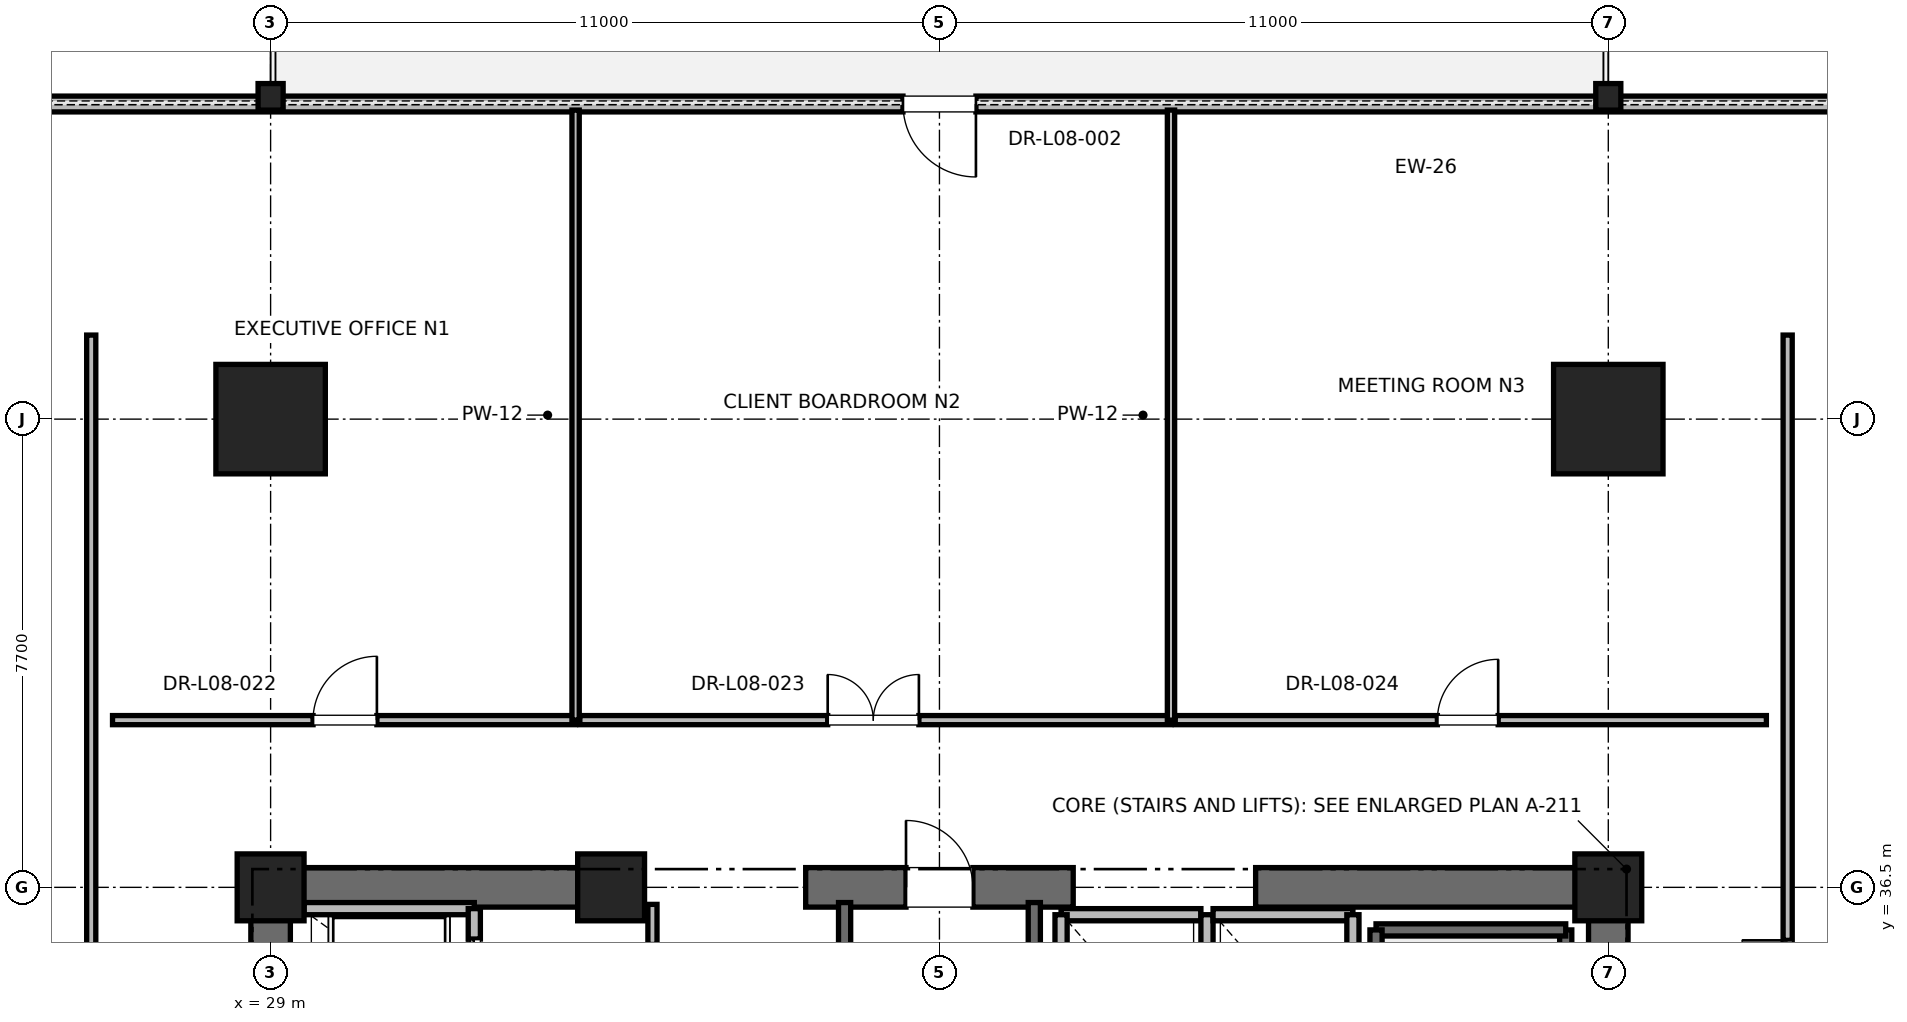
"""IFC4 building model, lengths in metres.
Left out: names, types, materials, properties, quantities, classifications, styles, units other than length and angle.
Written with IfcOpenShell. Run it as: python <this file> out.ifc"""

import sys

from ifc_helpers import new_model, si_unit, direction, frame, frame_2d, origin, origin_2d, place, context, subcontext, project, spatial, rectangle, i_section, extrude, element, fill, save


model = new_model("IFC4")
c1 = context("Model", 3, precision=1e-05, world=origin(), true_north=direction((0.0, 1.0)))
c2 = subcontext(c1, "Body", "Model", "MODEL_VIEW")
j1 = project(units=[si_unit("LENGTHUNIT", "METRE"), si_unit("PLANEANGLEUNIT", "RADIAN")], contexts=[c1])
p1 = place(None, origin())
s1 = spatial("IfcSite", under=j1, at=p1, CompositionType="ELEMENT")
p2 = place(p1, origin())
s2 = spatial("IfcBuilding", under=s1, at=p2, CompositionType="ELEMENT")
p3 = place(p2, frame((0.0, 0.0, 39.6)))
s3 = spatial("IfcBuildingStorey", under=s2, at=p3, CompositionType="ELEMENT", Elevation=39.6)
for number, where, z_axis, x_axis in (
    (1, (29.0, 44.2, 0.0), (0.0, 0.0, 1.0), (1.0, 0.0, 0.0)),
    (2, (51.0, 44.2, 0.0), (0.0, 0.0, 1.0), (1.0, 0.0, 0.0)),
):
    element("IfcColumn", number, at=place(p3, frame(where, z_axis=z_axis, x_axis=x_axis)), inside=s3, PredefinedType="COLUMN", context=c2, shape_type="SweptSolid", body=[
        extrude(rectangle(XDim=1.8, YDim=1.8, at=origin_2d()), origin(), (0.0, 0.0, 1.0), 4.0),
    ])
for number, where, z_axis, x_axis in (
    (3, (29.0, 49.5, 0.0), (0.0, 0.0, 1.0), (1.0, 0.0, 0.0)),
    (4, (51.0, 49.5, 0.0), (0.0, 0.0, 1.0), (1.0, 0.0, 0.0)),
):
    element("IfcColumn", number, at=place(p3, frame(where, z_axis=z_axis, x_axis=x_axis)), inside=s3, PredefinedType="COLUMN", context=c2, shape_type="SweptSolid", body=[
        extrude(i_section(OverallWidth=0.412, OverallDepth=0.437, WebThickness=0.036, FlangeThickness=0.058, FilletRadius=0.015, at=origin_2d()), origin(), (0.0, 0.0, 1.0), 4.0),
    ])
for number, where, z_axis, x_axis in (
    (5, (29.0, 36.5, 0.0), (0.0, 0.0, 1.0), (1.0, 0.0, 0.0)),
    (6, (51.0, 36.5, 0.0), (0.0, 0.0, 1.0), (1.0, 0.0, 0.0)),
    (7, (34.6, 36.5, 0.0), (0.0, 0.0, 1.0), (1.0, 0.0, 0.0)),
):
    element("IfcColumn", number, at=place(p3, frame(where, z_axis=z_axis, x_axis=x_axis)), inside=s3, PredefinedType="PILASTER", context=c2, shape_type="SweptSolid", body=[
        extrude(rectangle(XDim=1.1, YDim=1.1, at=origin_2d()), origin(), (0.0, 0.0, 1.0), 4.0),
    ])
p4 = place(p3, frame((29.0, 36.5, 0.0), z_axis=(0.0, 0.0, 1.0), x_axis=(1.0, 0.0, 0.0)))
e8 = element("IfcWall", 8, at=p4, inside=s3, PredefinedType="SHEAR", context=c2, shape_type="SweptSolid", body=[
    extrude(rectangle(XDim=5.8, YDim=0.65, at=frame_2d((2.9, 0.0))), origin(), (0.0, 0.0, 1.0), 3.76),
])
p5 = place(p3, frame((37.8, 36.5, 0.0), z_axis=(0.0, 0.0, 1.0), x_axis=(1.0, 0.0, 0.0)))
e9 = element("IfcWall", 9, at=p5, inside=s3, PredefinedType="SHEAR", context=c2, shape_type="SweptSolid", body=[
    extrude(rectangle(XDim=4.4, YDim=0.65, at=frame_2d((2.2, 0.0))), origin(), (0.0, 0.0, 1.0), 3.76),
])
p6 = place(p5, frame((1.65, 0.0, 0.0)))
e10 = element("IfcOpeningElement", 10, at=p6, cuts=e9, PredefinedType="OPENING", context=c2, shape_type="SweptSolid", body=[
    extrude(rectangle(XDim=1.1, YDim=2.15, at=frame_2d((0.55, 1.075))), frame((0.0, 0.325, 0.0), z_axis=(0.0, -1.0, 0.0), x_axis=(1.0, 0.0, 0.0)), (0.0, 0.0, 1.0), 0.65),
])
for number, where, z_axis, x_axis in (
    (11, (45.2, 36.5, 0.0), (0.0, 0.0, 1.0), (1.0, 0.0, 0.0)),
    (12, (29.0, 30.7, 0.0), (0.0, 0.0, 1.0), (0.0, 1.0, 0.0)),
):
    element("IfcWall", number, at=place(p3, frame(where, z_axis=z_axis, x_axis=x_axis)), inside=s3, PredefinedType="SHEAR", context=c2, shape_type="SweptSolid", body=[
        extrude(rectangle(XDim=5.8, YDim=0.65, at=frame_2d((2.9, 0.0))), origin(), (0.0, 0.0, 1.0), 3.76),
    ])
p7 = place(p3, frame((51.0, 27.7, 0.0), z_axis=(0.0, 0.0, 1.0), x_axis=(0.0, 1.0, 0.0)))
e13 = element("IfcWall", 13, at=p7, inside=s3, PredefinedType="SHEAR", context=c2, shape_type="SweptSolid", body=[
    extrude(rectangle(XDim=8.8, YDim=0.65, at=frame_2d((4.4, 0.0))), origin(), (0.0, 0.0, 1.0), 3.76),
])
p8 = place(p3, frame((61.403, 49.382, 0.0), z_axis=(0.0, 0.0, 1.0), x_axis=(-1.0, 0.0, 0.0)))
e14 = element("IfcWall", 14, at=p8, inside=s3, PredefinedType="PARAPET", context=c2, shape_type="SweptSolid", body=[
    extrude(rectangle(XDim=42.807, YDim=0.26, at=frame_2d((21.403, 0.0))), origin(), (0.0, 0.0, 1.0), 2.889),
])
p9 = place(p8, frame((4.2, 0.0, 0.85)))
e15 = element("IfcOpeningElement", 15, at=p9, cuts=e14, PredefinedType="OPENING", context=c2, shape_type="SweptSolid", body=[
    extrude(rectangle(XDim=1.8, YDim=2.2, at=frame_2d((0.9, 1.1))), frame((0.0, 0.13, 0.0), z_axis=(0.0, -1.0, 0.0), x_axis=(1.0, 0.0, 0.0)), (0.0, 0.0, 1.0), 0.26),
])
p10 = place(p8, frame((20.803, 0.0, 0.0)))
e16 = element("IfcOpeningElement", 16, at=p10, cuts=e14, PredefinedType="OPENING", context=c2, shape_type="SweptSolid", body=[
    extrude(rectangle(XDim=1.2, YDim=2.2, at=frame_2d((0.6, 1.1))), frame((0.0, 0.13, 0.0), z_axis=(0.0, -1.0, 0.0), x_axis=(1.0, 0.0, 0.0)), (0.0, 0.0, 1.0), 0.26),
])
p11 = place(p8, frame((36.806, 0.0, 0.85)))
e17 = element("IfcOpeningElement", 17, at=p11, cuts=e14, PredefinedType="OPENING", context=c2, shape_type="SweptSolid", body=[
    extrude(rectangle(XDim=1.8, YDim=2.2, at=frame_2d((0.9, 1.1))), frame((0.0, 0.13, 0.0), z_axis=(0.0, -1.0, 0.0), x_axis=(1.0, 0.0, 0.0)), (0.0, 0.0, 1.0), 0.26),
])
p12 = place(p3, frame((50.3, 27.65, 0.0), z_axis=(0.0, 0.0, 1.0), x_axis=(0.0, 1.0, 0.0)))
e18 = element("IfcWall", 18, at=p12, inside=s3, PredefinedType="SOLIDWALL", context=c2, shape_type="SweptSolid", body=[
    extrude(rectangle(XDim=8.15, YDim=0.2, at=frame_2d((4.075, 0.0))), origin(), (0.0, 0.0, 1.0), 3.76),
])
p13 = place(p3, frame((47.18, 35.8, 0.0), z_axis=(0.0, 0.0, 1.0), x_axis=(1.0, 0.0, 0.0)))
e19 = element("IfcWall", 19, at=p13, inside=s3, PredefinedType="SOLIDWALL", context=c2, shape_type="SweptSolid", body=[
    extrude(rectangle(XDim=3.12, YDim=0.2, at=frame_2d((1.56, 0.0))), origin(), (0.0, 0.0, 1.0), 3.76),
])
p14 = place(p3, frame((47.18, 27.62, 0.0), z_axis=(0.0, 0.0, 1.0), x_axis=(0.0, 1.0, 0.0)))
e20 = element("IfcWall", 20, at=p14, inside=s3, PredefinedType="SOLIDWALL", context=c2, shape_type="SweptSolid", body=[
    extrude(rectangle(XDim=8.18, YDim=0.2, at=frame_2d((4.09, 0.0))), origin(), (0.0, 0.0, 1.0), 3.76),
])
p15 = place(p3, frame((38.44, 27.38, 0.0), z_axis=(0.0, 0.0, 1.0), x_axis=(0.0, 1.0, 0.0)))
e21 = element("IfcWall", 21, at=p15, inside=s3, PredefinedType="SOLIDWALL", context=c2, shape_type="SweptSolid", body=[
    extrude(rectangle(XDim=8.87, YDim=0.2, at=frame_2d((4.435, 0.0))), origin(), (0.0, 0.0, 1.0), 3.76),
])
p16 = place(p3, frame((41.56, 27.68, 0.0), z_axis=(0.0, 0.0, 1.0), x_axis=(0.0, 1.0, 0.0)))
e22 = element("IfcWall", 22, at=p16, inside=s3, PredefinedType="SOLIDWALL", context=c2, shape_type="SweptSolid", body=[
    extrude(rectangle(XDim=8.57, YDim=0.2, at=frame_2d((4.285, 0.0))), origin(), (0.0, 0.0, 1.0), 3.76),
])
p17 = place(p3, frame((32.35, 36.15, 0.0), z_axis=(0.0, 0.0, 1.0), x_axis=(-1.0, 0.0, 0.0)))
e23 = element("IfcWall", 23, at=p17, inside=s3, PredefinedType="SOLIDWALL", context=c2, shape_type="SweptSolid", body=[
    extrude(rectangle(XDim=2.8, YDim=0.2, at=frame_2d((1.4, 0.0))), origin(), (0.0, 0.0, 1.0), 2.889),
])
p18 = place(p3, frame((32.35, 34.05, 0.0), z_axis=(0.0, 0.0, 1.0), x_axis=(0.0, 1.0, 0.0)))
e24 = element("IfcWall", 24, at=p18, inside=s3, PredefinedType="SOLIDWALL", context=c2, shape_type="SweptSolid", body=[
    extrude(rectangle(XDim=2.1, YDim=0.2, at=frame_2d((1.05, 0.0))), origin(), (0.0, 0.0, 1.0), 3.76),
])
p19 = place(p18, frame((0.5, 0.0, 0.0)))
e25 = element("IfcOpeningElement", 25, at=p19, cuts=e24, PredefinedType="OPENING", context=c2, shape_type="SweptSolid", body=[
    extrude(rectangle(XDim=1.1, YDim=2.2, at=frame_2d((0.55, 1.1))), frame((0.0, 0.1, 0.0), z_axis=(0.0, -1.0, 0.0), x_axis=(1.0, 0.0, 0.0)), (0.0, 0.0, 1.0), 0.2),
])
p20 = place(p3, frame((44.3, 36.05, 0.0), z_axis=(0.0, 0.0, 1.0), x_axis=(-1.0, 0.0, 0.0)))
e26 = element("IfcWall", 26, at=p20, inside=s3, PredefinedType="SOLIDWALL", context=c2, shape_type="SweptSolid", body=[
    extrude(rectangle(XDim=2.3, YDim=0.2, at=frame_2d((1.15, 0.0))), origin(), (0.0, 0.0, 1.0), 2.54),
])
for number, where, z_axis, x_axis in (
    (27, (42.0, 36.05, 0.0), (0.0, 0.0, 1.0), (0.0, -1.0, 0.0)),
    (28, (44.4, 33.45, 0.0), (0.0, 0.0, 1.0), (0.0, 1.0, 0.0)),
):
    element("IfcWall", number, at=place(p3, frame(where, z_axis=z_axis, x_axis=x_axis)), inside=s3, PredefinedType="SOLIDWALL", context=c2, shape_type="SweptSolid", body=[
        extrude(rectangle(XDim=2.6, YDim=0.2, at=frame_2d((1.3, 0.0))), origin(), (0.0, 0.0, 1.0), 2.54),
    ])
p21 = place(p3, frame((46.8, 36.05, 0.0), z_axis=(0.0, 0.0, 1.0), x_axis=(-1.0, 0.0, 0.0)))
e29 = element("IfcWall", 29, at=p21, inside=s3, PredefinedType="SOLIDWALL", context=c2, shape_type="SweptSolid", body=[
    extrude(rectangle(XDim=2.3, YDim=0.2, at=frame_2d((1.15, 0.0))), origin(), (0.0, 0.0, 1.0), 2.54),
])
p22 = place(p3, frame((46.8, 33.45, 0.0), z_axis=(0.0, 0.0, 1.0), x_axis=(0.0, 1.0, 0.0)))
e30 = element("IfcWall", 30, at=p22, inside=s3, PredefinedType="SOLIDWALL", context=c2, shape_type="SweptSolid", body=[
    extrude(rectangle(XDim=2.6, YDim=0.2, at=frame_2d((1.3, 0.0))), origin(), (0.0, 0.0, 1.0), 3.76),
])
p23 = place(p3, frame((35.28, 33.95, 0.0), z_axis=(0.0, 0.0, 1.0), x_axis=(0.0, 1.0, 0.0)))
e31 = element("IfcWall", 31, at=p23, inside=s3, PredefinedType="PARTITIONING", context=c2, shape_type="SweptSolid", body=[
    extrude(rectangle(XDim=2.27, YDim=0.15, at=frame_2d((1.135, 0.0))), origin(), (0.0, 0.0, 1.0), 2.54),
])
p24 = place(p23, frame((0.66, 0.0, 0.0)))
e32 = element("IfcOpeningElement", 32, at=p24, cuts=e31, PredefinedType="OPENING", context=c2, shape_type="SweptSolid", body=[
    extrude(rectangle(XDim=0.95, YDim=2.15, at=frame_2d((0.475, 1.075))), frame((0.0, 0.075, 0.0), z_axis=(0.0, -1.0, 0.0), x_axis=(1.0, 0.0, 0.0)), (0.0, 0.0, 1.0), 0.15),
])
p25 = place(p3, frame((26.4, 39.25, 0.0), z_axis=(0.0, 0.0, 1.0), x_axis=(1.0, 0.0, 0.0)))
e33 = element("IfcWall", 33, at=p25, inside=s3, PredefinedType="PARTITIONING", context=c2, shape_type="SweptSolid", body=[
    extrude(rectangle(XDim=7.616, YDim=0.15, at=frame_2d((3.808, 0.0))), origin(), (0.0, 0.0, 1.0), 2.85),
])
p26 = place(p25, frame((3.298, 0.0, 0.0)))
e34 = element("IfcOpeningElement", 34, at=p26, cuts=e33, PredefinedType="OPENING", context=c2, shape_type="SweptSolid", body=[
    extrude(rectangle(XDim=1.05, YDim=2.2, at=frame_2d((0.525, 1.1))), frame((0.0, 0.075, 0.0), z_axis=(0.0, -1.0, 0.0), x_axis=(1.0, 0.0, 0.0)), (0.0, 0.0, 1.0), 0.15),
])
p27 = place(p3, frame((34.016, 39.25, 0.0), z_axis=(0.0, 0.0, 1.0), x_axis=(0.0, 1.0, 0.0)))
e35 = element("IfcWall", 35, at=p27, inside=s3, PredefinedType="PARTITIONING", context=c2, shape_type="SweptSolid", body=[
    extrude(rectangle(XDim=10.032, YDim=0.12, at=frame_2d((5.016, 0.0))), origin(), (0.0, 0.0, 1.0), 2.39),
])
p28 = place(p3, frame((34.086, 39.25, 0.0), z_axis=(0.0, 0.0, 1.0), x_axis=(1.0, 0.0, 0.0)))
e36 = element("IfcWall", 36, at=p28, inside=s3, PredefinedType="PARTITIONING", context=c2, shape_type="SweptSolid", body=[
    extrude(rectangle(XDim=9.722, YDim=0.15, at=frame_2d((4.861, 0.0))), origin(), (0.0, 0.0, 1.0), 2.85),
])
p29 = place(p28, frame((4.076, 0.0, 0.0)))
e37 = element("IfcOpeningElement", 37, at=p29, cuts=e36, PredefinedType="OPENING", context=c2, shape_type="SweptSolid", body=[
    extrude(rectangle(XDim=1.5, YDim=2.25, at=frame_2d((0.75, 1.125))), frame((0.0, 0.075, 0.0), z_axis=(0.0, -1.0, 0.0), x_axis=(1.0, 0.0, 0.0)), (0.0, 0.0, 1.0), 0.15),
])
p30 = place(p3, frame((43.808, 39.25, 0.0), z_axis=(0.0, 0.0, 1.0), x_axis=(0.0, 1.0, 0.0)))
e38 = element("IfcWall", 38, at=p30, inside=s3, PredefinedType="PARTITIONING", context=c2, shape_type="SweptSolid", body=[
    extrude(rectangle(XDim=10.032, YDim=0.12, at=frame_2d((5.016, 0.0))), origin(), (0.0, 0.0, 1.0), 2.39),
])
p31 = place(p3, frame((43.878, 39.25, 0.0), z_axis=(0.0, 0.0, 1.0), x_axis=(1.0, 0.0, 0.0)))
e39 = element("IfcWall", 39, at=p31, inside=s3, PredefinedType="PARTITIONING", context=c2, shape_type="SweptSolid", body=[
    extrude(rectangle(XDim=9.722, YDim=0.15, at=frame_2d((4.861, 0.0))), origin(), (0.0, 0.0, 1.0), 2.85),
])
p32 = place(p31, frame((4.311, 0.0, 0.0)))
e40 = element("IfcOpeningElement", 40, at=p32, cuts=e39, PredefinedType="OPENING", context=c2, shape_type="SweptSolid", body=[
    extrude(rectangle(XDim=1.0, YDim=2.15, at=frame_2d((0.5, 1.075))), frame((0.0, 0.075, 0.0), z_axis=(0.0, -1.0, 0.0), x_axis=(1.0, 0.0, 0.0)), (0.0, 0.0, 1.0), 0.15),
])
p33 = place(p3, frame((26.05, 23.23, 0.0), z_axis=(0.0, 0.0, 1.0), x_axis=(0.0, 1.0, 0.0)))
e41 = element("IfcWall", 41, at=p33, inside=s3, PredefinedType="PARTITIONING", context=c2, shape_type="SweptSolid", body=[
    extrude(rectangle(XDim=22.352, YDim=0.15, at=frame_2d((11.176, 0.0))), origin(), (0.0, 0.0, 1.0), 2.85),
])
p34 = place(p33, frame((6.085, 0.0, 0.0)))
e42 = element("IfcOpeningElement", 42, at=p34, cuts=e41, PredefinedType="OPENING", context=c2, shape_type="SweptSolid", body=[
    extrude(rectangle(XDim=1.0, YDim=2.15, at=frame_2d((0.5, 1.075))), frame((0.0, 0.075, 0.0), z_axis=(0.0, -1.0, 0.0), x_axis=(1.0, 0.0, 0.0)), (0.0, 0.0, 1.0), 0.15),
])
p35 = place(p3, frame((53.95, 33.356, 0.0), z_axis=(0.0, 0.0, 1.0), x_axis=(0.0, 1.0, 0.0)))
e43 = element("IfcWall", 43, at=p35, inside=s3, PredefinedType="PARTITIONING", context=c2, shape_type="SweptSolid", body=[
    extrude(rectangle(XDim=12.226, YDim=0.15, at=frame_2d((6.113, 0.0))), origin(), (0.0, 0.0, 1.0), 2.85),
])
p36 = place(p35, frame((0.772, 0.0, 0.0)))
e44 = element("IfcOpeningElement", 44, at=p36, cuts=e43, PredefinedType="OPENING", context=c2, shape_type="SweptSolid", body=[
    extrude(rectangle(XDim=1.5, YDim=2.25, at=frame_2d((0.75, 1.125))), frame((0.0, 0.075, 0.0), z_axis=(0.0, -1.0, 0.0), x_axis=(1.0, 0.0, 0.0)), (0.0, 0.0, 1.0), 0.15),
])
p37 = place(p10, origin())
e45 = element("IfcDoor", 45, at=p37, inside=s3, OperationType="SINGLE_SWING_LEFT", PredefinedType="DOOR", context=c2, shape_type="SweptSolid", body=[
    extrude(rectangle(XDim=1.2, YDim=2.2, at=frame_2d((0.6, 1.1))), frame((0.0, 0.025, 0.0), z_axis=(0.0, -1.0, 0.0), x_axis=(1.0, 0.0, 0.0)), (0.0, 0.0, 1.0), 0.05),
])
fill(e16, e45)
p38 = place(p6, origin())
e46 = element("IfcDoor", 46, at=p38, inside=s3, OperationType="SINGLE_SWING_LEFT", PredefinedType="DOOR", context=c2, shape_type="SweptSolid", body=[
    extrude(rectangle(XDim=1.1, YDim=2.15, at=frame_2d((0.55, 1.075))), frame((0.0, 0.025, 0.0), z_axis=(0.0, -1.0, 0.0), x_axis=(1.0, 0.0, 0.0)), (0.0, 0.0, 1.0), 0.05),
])
fill(e10, e46)
p39 = place(p19, origin())
e47 = element("IfcDoor", 47, at=p39, inside=s3, OperationType="SLIDING_TO_RIGHT", PredefinedType="DOOR", context=c2, shape_type="SweptSolid", body=[
    extrude(rectangle(XDim=1.1, YDim=2.2, at=frame_2d((0.55, 1.1))), frame((0.0, 0.025, 0.0), z_axis=(0.0, -1.0, 0.0), x_axis=(1.0, 0.0, 0.0)), (0.0, 0.0, 1.0), 0.05),
])
fill(e25, e47)
p40 = place(p26, origin())
e48 = element("IfcDoor", 48, at=p40, inside=s3, OperationType="SINGLE_SWING_RIGHT", PredefinedType="DOOR", context=c2, shape_type="SweptSolid", body=[
    extrude(rectangle(XDim=1.05, YDim=2.2, at=frame_2d((0.525, 1.1))), frame((0.0, 0.025, 0.0), z_axis=(0.0, -1.0, 0.0), x_axis=(1.0, 0.0, 0.0)), (0.0, 0.0, 1.0), 0.05),
])
fill(e34, e48)
p41 = place(p29, origin())
e49 = element("IfcDoor", 49, at=p41, inside=s3, OperationType="DOUBLE_DOOR_SINGLE_SWING", PredefinedType="DOOR", context=c2, shape_type="SweptSolid", body=[
    extrude(rectangle(XDim=1.5, YDim=2.25, at=frame_2d((0.75, 1.125))), frame((0.0, 0.025, 0.0), z_axis=(0.0, -1.0, 0.0), x_axis=(1.0, 0.0, 0.0)), (0.0, 0.0, 1.0), 0.05),
])
fill(e37, e49)
p42 = place(p32, origin())
e50 = element("IfcDoor", 50, at=p42, inside=s3, OperationType="SINGLE_SWING_RIGHT", PredefinedType="DOOR", context=c2, shape_type="SweptSolid", body=[
    extrude(rectangle(XDim=1.0, YDim=2.15, at=frame_2d((0.5, 1.075))), frame((0.0, 0.025, 0.0), z_axis=(0.0, -1.0, 0.0), x_axis=(1.0, 0.0, 0.0)), (0.0, 0.0, 1.0), 0.05),
])
fill(e40, e50)
p43 = place(p36, origin())
e51 = element("IfcDoor", 51, at=p43, inside=s3, OperationType="DOUBLE_DOOR_SINGLE_SWING", PredefinedType="DOOR", context=c2, shape_type="SweptSolid", body=[
    extrude(rectangle(XDim=1.5, YDim=2.25, at=frame_2d((0.75, 1.125))), frame((0.0, 0.025, 0.0), z_axis=(0.0, -1.0, 0.0), x_axis=(1.0, 0.0, 0.0)), (0.0, 0.0, 1.0), 0.05),
])
fill(e44, e51)
save(model, sys.argv[1])
